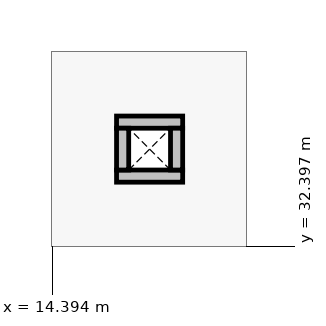
"""IFC4 building model, lengths in metres.
Left out: names, types, materials, properties, quantities, classifications, styles, units other than length and angle.
Written with IfcOpenShell. Run it as: python <this file> out.ifc"""

import sys

from ifc_helpers import new_model, si_unit, direction, frame, frame_2d, origin, place, context, subcontext, project, spatial, rectangle, extrude, element, save


model = new_model("IFC4")
c1 = context("Model", 3, precision=1e-05, world=origin(), true_north=direction((0.0, 1.0)))
c2 = subcontext(c1, "Body", "Model", "MODEL_VIEW")
j1 = project(units=[si_unit("LENGTHUNIT", "METRE"), si_unit("PLANEANGLEUNIT", "RADIAN")], contexts=[c1])
p1 = place(None, origin())
s1 = spatial("IfcSite", under=j1, at=p1, CompositionType="ELEMENT")
p2 = place(p1, origin())
s2 = spatial("IfcBuilding", under=s1, at=p2, CompositionType="ELEMENT")
p3 = place(p2, frame((0.0, 0.0, 4.8)))
s3 = spatial("IfcBuildingStorey", under=s2, at=p3, CompositionType="ELEMENT", Elevation=4.8)
for number, where, z_axis, x_axis in (
    (1, (15.24, 33.32, 0.0), (0.0, 0.0, 1.0), (1.0, 0.0, 0.0)),
    (2, (15.24, 34.03, 0.0), (0.0, 0.0, 1.0), (1.0, 0.0, 0.0)),
):
    element("IfcWall", number, at=place(p3, frame(where, z_axis=z_axis, x_axis=x_axis)), inside=s3, PredefinedType="PARTITIONING", context=c2, shape_type="SweptSolid", body=[
        extrude(rectangle(XDim=0.87, YDim=0.16, at=frame_2d((0.435, 0.0))), origin(), (0.0, 0.0, 1.0), 3.35),
    ])
for number, where, z_axis, x_axis in (
    (3, (15.32, 33.4, 0.0), (0.0, 0.0, 1.0), (0.0, 1.0, 0.0)),
    (4, (16.03, 33.4, 0.0), (0.0, 0.0, 1.0), (0.0, 1.0, 0.0)),
):
    element("IfcWall", number, at=place(p3, frame(where, z_axis=z_axis, x_axis=x_axis)), inside=s3, PredefinedType="PARTITIONING", context=c2, shape_type="SweptSolid", body=[
        extrude(rectangle(XDim=0.55, YDim=0.16, at=frame_2d((0.275, 0.0))), origin(), (0.0, 0.0, 1.0), 3.35),
    ])
save(model, sys.argv[1])
